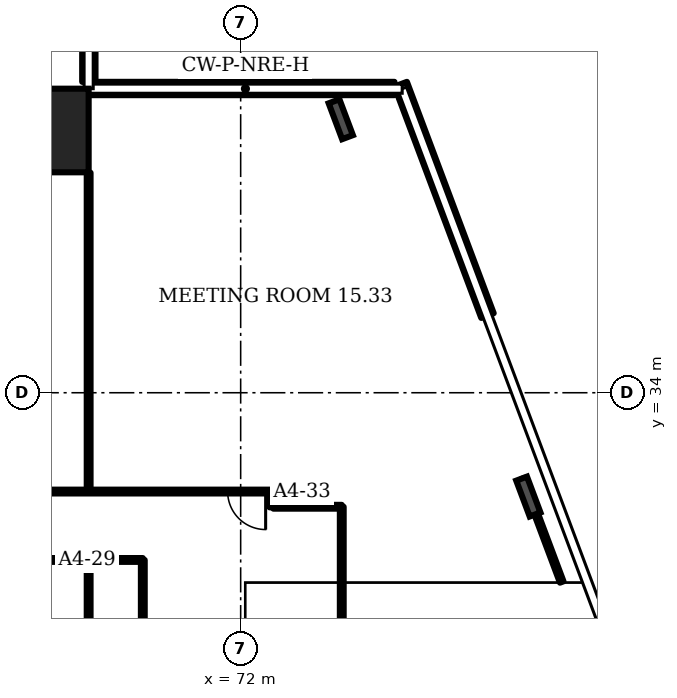
"""IFC4 building model, lengths in metres.
Left out: names, types, materials, properties, quantities, classifications, styles, units other than length and angle.
Written with IfcOpenShell. Run it as: python <this file> out.ifc"""

import sys

from ifc_helpers import new_model, si_unit, direction, frame, frame_2d, origin, origin_2d, place, context, subcontext, project, spatial, rectangle, i_section, extrude, element, fill, save


model = new_model("IFC4")
c1 = context("Model", 3, precision=1e-05, world=origin(), true_north=direction((0.0, 1.0)))
c2 = subcontext(c1, "Body", "Model", "MODEL_VIEW")
j1 = project(units=[si_unit("LENGTHUNIT", "METRE"), si_unit("PLANEANGLEUNIT", "RADIAN")], contexts=[c1])
p1 = place(None, origin())
s1 = spatial("IfcSite", under=j1, at=p1, CompositionType="ELEMENT")
p2 = place(p1, origin())
s2 = spatial("IfcBuilding", under=s1, at=p2, CompositionType="ELEMENT")
p3 = place(p2, frame((0.0, 0.0, 73.9)))
s3 = spatial("IfcBuildingStorey", under=s2, at=p3, CompositionType="ELEMENT", Elevation=73.9)
p4 = place(p3, frame((66.9, 40.9, 0.0), z_axis=(0.0, 0.0, 1.0), x_axis=(1.0, 0.0, 0.0)))
e1 = element("IfcColumn", 1, at=p4, inside=s3, PredefinedType="COLUMN", context=c2, shape_type="SweptSolid", body=[
    extrude(rectangle(XDim=2.2, YDim=2.2, at=origin_2d()), origin(), (0.0, 0.0, 1.0), 3.6),
])
for number, where, z_axis, x_axis in (
    (2, (79.57, 31.268, 0.0), (0.0, 0.0, 1.0), (0.936, 0.351, 0.0)),
    (3, (74.634, 41.196, 0.0), (0.0, 0.0, 1.0), (0.936, 0.351, 0.0)),
):
    element("IfcColumn", number, at=place(p3, frame(where, z_axis=z_axis, x_axis=x_axis)), inside=s3, PredefinedType="COLUMN", context=c2, shape_type="SweptSolid", body=[
        extrude(i_section(OverallWidth=0.302, OverallDepth=1.008, WebThickness=0.021, FlangeThickness=0.04, FilletRadius=0.03, at=origin_2d()), origin(), (0.0, 0.0, 1.0), 3.6),
    ])
p5 = place(p3, frame((78.494, 36.03, 0.0), z_axis=(0.0, 0.0, 1.0), x_axis=(-0.351108, 0.936338, 0.0)))
e4 = element("IfcWall", 4, at=p5, inside=s3, PredefinedType="SOLIDWALL", context=c2, shape_type="SweptSolid", body=[
    extrude(rectangle(XDim=6.503, YDim=0.35, at=frame_2d((3.251, 0.0))), origin(), (0.0, 0.0, 1.0), 1.0),
])
p6 = place(p3, frame((76.047, 42.005, 0.0), z_axis=(0.0, 0.0, 1.0), x_axis=(-1.0, 0.0, 0.0)))
e5 = element("IfcWall", 5, at=p6, inside=s3, PredefinedType="SOLIDWALL", context=c2, shape_type="SweptSolid", body=[
    extrude(rectangle(XDim=8.047, YDim=0.35, at=frame_2d((4.023, 0.0))), origin(), (0.0, 0.0, 1.0), 1.0),
])
p7 = place(p3, frame((68.005, 42.18, 0.0), z_axis=(0.0, 0.0, 1.0), x_axis=(0.0, 1.0, 0.0)))
e6 = element("IfcWall", 6, at=p7, inside=s3, PredefinedType="SOLIDWALL", context=c2, shape_type="SweptSolid", body=[
    extrude(rectangle(XDim=5.947, YDim=0.35, at=frame_2d((2.973, 0.0))), origin(), (0.0, 0.0, 1.0), 1.0),
])
p8 = place(p3, frame((65.0, 29.6, 0.0), z_axis=(0.0, 0.0, 1.0), x_axis=(1.0, 0.0, 0.0)))
e7 = element("IfcWall", 7, at=p8, inside=s3, PredefinedType="PARTITIONING", context=c2, shape_type="SweptSolid", body=[
    extrude(rectangle(XDim=4.425, YDim=0.1, at=frame_2d((2.212, 0.0))), origin(), (0.0, 0.0, 1.0), 3.2),
])
p9 = place(p8, frame((0.2, 0.0, 0.0)))
e8 = element("IfcOpeningElement", 8, at=p9, cuts=e7, PredefinedType="OPENING", context=c2, shape_type="SweptSolid", body=[
    extrude(rectangle(XDim=1.8, YDim=2.1, at=frame_2d((0.9, 1.05))), frame((0.0, 0.06, 0.0), z_axis=(0.0, -1.0, 0.0), x_axis=(1.0, 0.0, 0.0)), (0.0, 0.0, 1.0), 0.12),
])
p10 = place(p3, frame((65.0, 31.4, 0.0), z_axis=(0.0, 0.0, 1.0), x_axis=(1.0, 0.0, 0.0)))
e9 = element("IfcWall", 9, at=p10, inside=s3, PredefinedType="PARTITIONING", context=c2, shape_type="SweptSolid", body=[
    extrude(rectangle(XDim=7.81, YDim=0.1, at=frame_2d((3.905, 0.0))), origin(), (0.0, 0.0, 1.0), 3.2),
])
p11 = place(p10, frame((6.657, 0.0, 0.0)))
e10 = element("IfcOpeningElement", 10, at=p11, cuts=e9, PredefinedType="OPENING", context=c2, shape_type="SweptSolid", body=[
    extrude(rectangle(XDim=1.0, YDim=2.1, at=frame_2d((0.5, 1.05))), frame((0.0, 0.06, 0.0), z_axis=(0.0, -1.0, 0.0), x_axis=(1.0, 0.0, 0.0)), (0.0, 0.0, 1.0), 0.12),
])
p12 = place(p3, frame((68.0, 13.24, 0.0), z_axis=(0.0, 0.0, 1.0), x_axis=(0.0, 1.0, 0.0)))
e11 = element("IfcWall", 11, at=p12, inside=s3, PredefinedType="PARTITIONING", context=c2, shape_type="SweptSolid", body=[
    extrude(rectangle(XDim=16.36, YDim=0.1, at=frame_2d((8.18, 0.0))), origin(), (0.0, 0.0, 1.0), 3.2),
])
p13 = place(p3, frame((68.0, 31.4, 0.0), z_axis=(0.0, 0.0, 1.0), x_axis=(0.0, 1.0, 0.0)))
e12 = element("IfcWall", 12, at=p13, inside=s3, PredefinedType="PARTITIONING", context=c2, shape_type="SweptSolid", body=[
    extrude(rectangle(XDim=8.39, YDim=0.1, at=frame_2d((4.195, 0.0))), origin(), (0.0, 0.0, 1.0), 3.2),
])
p14 = place(p3, frame((69.425, 26.4, 0.0), z_axis=(0.0, 0.0, 1.0), x_axis=(0.0, 1.0, 0.0)))
e13 = element("IfcWall", 13, at=p14, inside=s3, PredefinedType="PARTITIONING", context=c2, shape_type="SweptSolid", body=[
    extrude(rectangle(XDim=3.2, YDim=0.1, at=frame_2d((1.6, 0.0))), origin(), (0.0, 0.0, 1.0), 3.2),
])
p15 = place(p3, frame((72.81, 30.985, 0.0), z_axis=(0.0, 0.0, 1.0), x_axis=(0.0, 1.0, 0.0)))
e14 = element("IfcWall", 14, at=p15, inside=s3, PredefinedType="PARTITIONING", context=c2, shape_type="SweptSolid", body=[
    extrude(rectangle(XDim=0.415, YDim=0.1, at=frame_2d((0.208, 0.0))), origin(), (0.0, 0.0, 1.0), 3.2),
])
p16 = place(p3, frame((72.86, 31.0, 0.0), z_axis=(0.0, 0.0, 1.0), x_axis=(1.0, 0.0, 0.0)))
e15 = element("IfcWall", 15, at=p16, inside=s3, PredefinedType="PARTITIONING", context=c2, shape_type="SweptSolid", body=[
    extrude(rectangle(XDim=1.8, YDim=0.1, at=frame_2d((0.9, 0.0))), origin(), (0.0, 0.0, 1.0), 3.2),
])
p17 = place(p3, frame((74.66, 27.675, 0.0), z_axis=(0.0, 0.0, 1.0), x_axis=(0.0, 1.0, 0.0)))
e16 = element("IfcWall", 16, at=p17, inside=s3, PredefinedType="PARTITIONING", context=c2, shape_type="SweptSolid", body=[
    extrude(rectangle(XDim=3.325, YDim=0.1, at=frame_2d((1.663, 0.0))), origin(), (0.0, 0.0, 1.0), 3.2),
])
p18 = place(p3, frame((80.448, 29.02, 0.0), z_axis=(0.0, 0.0, 1.0), x_axis=(-0.35129, 0.93627, 0.0)))
e17 = element("IfcWall", 17, at=p18, inside=s3, PredefinedType="PARTITIONING", context=c2, shape_type="SweptSolid", body=[
    extrude(rectangle(XDim=2.911, YDim=0.1, at=frame_2d((1.455, 0.0))), origin(), (0.0, 0.0, 1.0), 2.58),
])
p19 = place(p11, origin())
e18 = element("IfcDoor", 18, at=p19, inside=s3, OperationType="SINGLE_SWING_RIGHT", PredefinedType="DOOR", context=c2, shape_type="SweptSolid", body=[
    extrude(rectangle(XDim=1.0, YDim=2.1, at=frame_2d((0.5, 1.05))), frame((0.0, 0.025, 0.0), z_axis=(0.0, -1.0, 0.0), x_axis=(1.0, 0.0, 0.0)), (0.0, 0.0, 1.0), 0.05),
])
fill(e10, e18)
save(model, sys.argv[1])
